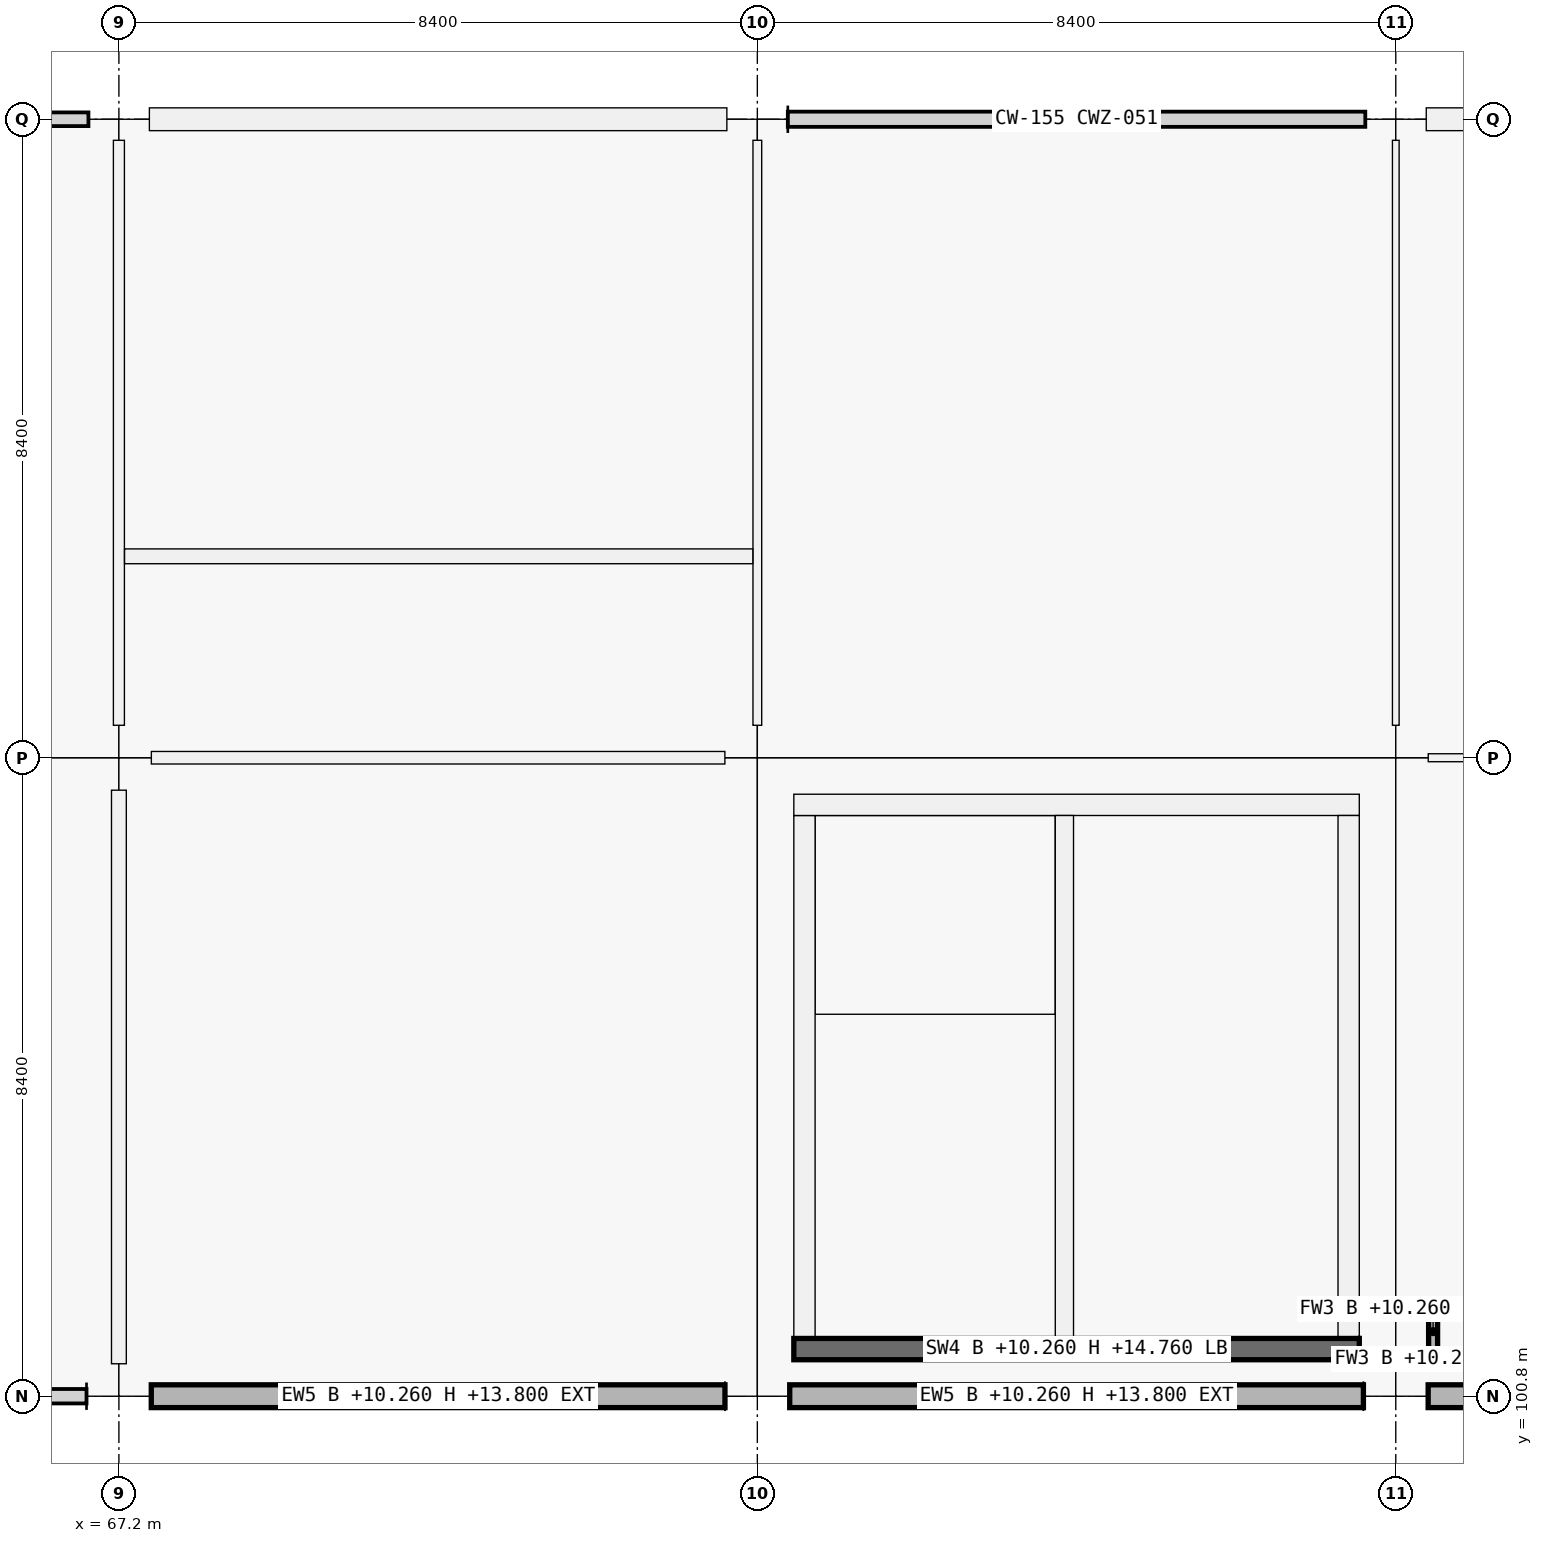
"""IFC4 building model, lengths in metres.
Left out: names, types, materials, properties, quantities, classifications, styles, units other than length and angle.
Written with IfcOpenShell. Run it as: python <this file> out.ifc"""

import sys

from ifc_helpers import new_model, si_unit, direction, frame, frame_2d, origin, origin_2d, place, context, subcontext, project, spatial, rectangle, extrude, element, fill, save


model = new_model("IFC4")
c1 = context("Model", 3, precision=1e-05, world=origin(), true_north=direction((0.0, 1.0)))
c2 = subcontext(c1, "Body", "Model", "MODEL_VIEW")
j1 = project(units=[si_unit("LENGTHUNIT", "METRE"), si_unit("PLANEANGLEUNIT", "RADIAN")], contexts=[c1])
p1 = place(None, origin())
s1 = spatial("IfcSite", under=j1, at=p1, CompositionType="ELEMENT")
p2 = place(p1, origin())
s2 = spatial("IfcBuilding", under=s1, at=p2, CompositionType="ELEMENT")
p3 = place(p2, frame((0.0, 0.0, 10.26)))
s3 = spatial("IfcBuildingStorey", under=s2, at=p3, CompositionType="ELEMENT", Elevation=10.26)
for number, where, z_axis, x_axis in (
    (1, (67.2, 100.8, 0.0), (0.0, 0.0, 1.0), (1.0, 0.0, 0.0)),
    (2, (67.2, 109.2, 0.0), (0.0, 0.0, 1.0), (1.0, 0.0, 0.0)),
):
    element("IfcColumn", number, at=place(p3, frame(where, z_axis=z_axis, x_axis=x_axis)), inside=s3, PredefinedType="COLUMN", context=c2, shape_type="SweptSolid", body=[
        extrude(rectangle(XDim=0.85, YDim=0.85, at=origin_2d()), origin(), (0.0, 0.0, 1.0), 4.5),
    ])
p4 = place(p3, frame((67.2, 117.6, 0.0), z_axis=(0.0, 0.0, 1.0), x_axis=(1.0, 0.0, 0.0)))
e3 = element("IfcColumn", 3, at=p4, inside=s3, PredefinedType="COLUMN", context=c2, shape_type="SweptSolid", body=[
    extrude(rectangle(XDim=0.8, YDim=0.55, at=origin_2d()), origin(), (0.0, 0.0, 1.0), 4.5),
])
for number, where, z_axis, x_axis in (
    (4, (75.6, 100.8, 0.0), (0.0, 0.0, 1.0), (1.0, 0.0, 0.0)),
    (5, (75.6, 109.2, 0.0), (0.0, 0.0, 1.0), (1.0, 0.0, 0.0)),
):
    element("IfcColumn", number, at=place(p3, frame(where, z_axis=z_axis, x_axis=x_axis)), inside=s3, PredefinedType="COLUMN", context=c2, shape_type="SweptSolid", body=[
        extrude(rectangle(XDim=0.85, YDim=0.85, at=origin_2d()), origin(), (0.0, 0.0, 1.0), 4.5),
    ])
p5 = place(p3, frame((75.6, 117.6, 0.0), z_axis=(0.0, 0.0, 1.0), x_axis=(1.0, 0.0, 0.0)))
e6 = element("IfcColumn", 6, at=p5, inside=s3, PredefinedType="COLUMN", context=c2, shape_type="SweptSolid", body=[
    extrude(rectangle(XDim=0.8, YDim=0.55, at=origin_2d()), origin(), (0.0, 0.0, 1.0), 4.5),
])
for number, where, z_axis, x_axis in (
    (7, (84.0, 100.8, 0.0), (0.0, 0.0, 1.0), (1.0, 0.0, 0.0)),
    (8, (84.0, 109.2, 0.0), (0.0, 0.0, 1.0), (1.0, 0.0, 0.0)),
):
    element("IfcColumn", number, at=place(p3, frame(where, z_axis=z_axis, x_axis=x_axis)), inside=s3, PredefinedType="COLUMN", context=c2, shape_type="SweptSolid", body=[
        extrude(rectangle(XDim=0.85, YDim=0.85, at=origin_2d()), origin(), (0.0, 0.0, 1.0), 4.5),
    ])
p6 = place(p3, frame((84.0, 117.6, 0.0), z_axis=(0.0, 0.0, 1.0), x_axis=(1.0, 0.0, 0.0)))
e9 = element("IfcColumn", 9, at=p6, inside=s3, PredefinedType="COLUMN", context=c2, shape_type="SweptSolid", body=[
    extrude(rectangle(XDim=0.8, YDim=0.55, at=origin_2d()), origin(), (0.0, 0.0, 1.0), 4.5),
])
p7 = place(p3, frame((75.174, 100.8, 0.0), z_axis=(0.0, 0.0, 1.0), x_axis=(-1.0, 0.0, 0.0)))
e10 = element("IfcWall", 10, at=p7, inside=s3, PredefinedType="SOLIDWALL", context=c2, shape_type="SweptSolid", body=[
    extrude(rectangle(XDim=7.548, YDim=0.3, at=frame_2d((3.774, 0.0))), origin(), (0.0, 0.0, 1.0), 3.54),
])
p8 = place(p3, frame((67.601, 117.6, 0.0), z_axis=(0.0, 0.0, 1.0), x_axis=(1.0, 0.0, 0.0)))
e11 = element("IfcWall", 11, at=p8, inside=s3, PredefinedType="SOLIDWALL", context=c2, shape_type="SweptSolid", body=[
    extrude(rectangle(XDim=7.598, YDim=0.3, at=frame_2d((3.799, 0.0))), origin(), (0.0, 0.0, 1.0), 3.54),
])
p9 = place(p8, frame((3.124, 0.0, 0.9)))
e12 = element("IfcOpeningElement", 12, at=p9, cuts=e11, PredefinedType="OPENING", context=c2, shape_type="SweptSolid", body=[
    extrude(rectangle(XDim=1.35, YDim=1.5, at=frame_2d((0.675, 0.75))), frame((0.0, 0.15, 0.0), z_axis=(0.0, -1.0, 0.0), x_axis=(1.0, 0.0, 0.0)), (0.0, 0.0, 1.0), 0.3),
])
p10 = place(p3, frame((83.574, 100.8, 0.0), z_axis=(0.0, 0.0, 1.0), x_axis=(-1.0, 0.0, 0.0)))
e13 = element("IfcWall", 13, at=p10, inside=s3, PredefinedType="SOLIDWALL", context=c2, shape_type="SweptSolid", body=[
    extrude(rectangle(XDim=7.548, YDim=0.3, at=frame_2d((3.774, 0.0))), origin(), (0.0, 0.0, 1.0), 3.54),
])
p11 = place(p3, frame((91.974, 100.8, 0.0), z_axis=(0.0, 0.0, 1.0), x_axis=(-1.0, 0.0, 0.0)))
e14 = element("IfcWall", 14, at=p11, inside=s3, PredefinedType="SOLIDWALL", context=c2, shape_type="SweptSolid", body=[
    extrude(rectangle(XDim=7.548, YDim=0.3, at=frame_2d((3.774, 0.0))), origin(), (0.0, 0.0, 1.0), 3.54),
])
p12 = place(p11, frame((3.324, 0.0, 0.9)))
e15 = element("IfcOpeningElement", 15, at=p12, cuts=e14, PredefinedType="OPENING", context=c2, shape_type="SweptSolid", body=[
    extrude(rectangle(XDim=0.9, YDim=1.5, at=frame_2d((0.45, 0.75))), frame((0.0, 0.15, 0.0), z_axis=(0.0, -1.0, 0.0), x_axis=(1.0, 0.0, 0.0)), (0.0, 0.0, 1.0), 0.3),
])
p13 = place(p3, frame((84.401, 117.6, 0.0), z_axis=(0.0, 0.0, 1.0), x_axis=(1.0, 0.0, 0.0)))
e16 = element("IfcWall", 16, at=p13, inside=s3, PredefinedType="SOLIDWALL", context=c2, shape_type="SweptSolid", body=[
    extrude(rectangle(XDim=7.598, YDim=0.3, at=frame_2d((3.799, 0.0))), origin(), (0.0, 0.0, 1.0), 3.54),
])
p14 = place(p13, frame((2.949, 0.0, 0.9)))
e17 = element("IfcOpeningElement", 17, at=p14, cuts=e16, PredefinedType="OPENING", context=c2, shape_type="SweptSolid", body=[
    extrude(rectangle(XDim=1.7, YDim=1.85, at=frame_2d((0.85, 0.925))), frame((0.0, 0.15, 0.0), z_axis=(0.0, -1.0, 0.0), x_axis=(1.0, 0.0, 0.0)), (0.0, 0.0, 1.0), 0.3),
])
p15 = place(p3, frame((83.52, 101.42, 0.0), z_axis=(0.0, 0.0, 1.0), x_axis=(-1.0, 0.0, 0.0)))
e18 = element("IfcWall", 18, at=p15, inside=s3, PredefinedType="SHEAR", context=c2, shape_type="SweptSolid", body=[
    extrude(rectangle(XDim=7.44, YDim=0.28, at=frame_2d((3.72, 0.0))), origin(), (0.0, 0.0, 1.0), 4.5),
])
p16 = place(p3, frame((76.22, 101.56, 0.0), z_axis=(0.0, 0.0, 1.0), x_axis=(0.0, 1.0, 0.0)))
e19 = element("IfcWall", 19, at=p16, inside=s3, PredefinedType="SHEAR", context=c2, shape_type="SweptSolid", body=[
    extrude(rectangle(XDim=6.88, YDim=0.28, at=frame_2d((3.44, 0.0))), origin(), (0.0, 0.0, 1.0), 4.5),
])
p17 = place(p3, frame((76.08, 108.58, 0.0), z_axis=(0.0, 0.0, 1.0), x_axis=(1.0, 0.0, 0.0)))
e20 = element("IfcWall", 20, at=p17, inside=s3, PredefinedType="SHEAR", context=c2, shape_type="SweptSolid", body=[
    extrude(rectangle(XDim=7.44, YDim=0.28, at=frame_2d((3.72, 0.0))), origin(), (0.0, 0.0, 1.0), 4.5),
])
p18 = place(p3, frame((83.38, 108.44, 0.0), z_axis=(0.0, 0.0, 1.0), x_axis=(0.0, -1.0, 0.0)))
e21 = element("IfcWall", 21, at=p18, inside=s3, PredefinedType="SHEAR", context=c2, shape_type="SweptSolid", body=[
    extrude(rectangle(XDim=6.88, YDim=0.28, at=frame_2d((3.44, 0.0))), origin(), (0.0, 0.0, 1.0), 4.5),
])
p19 = place(p18, frame((3.99, 0.0, 0.0)))
e22 = element("IfcOpeningElement", 22, at=p19, cuts=e21, PredefinedType="OPENING", context=c2, shape_type="SweptSolid", body=[
    extrude(rectangle(XDim=1.5, YDim=2.15, at=frame_2d((0.75, 1.075))), frame((0.0, 0.14, 0.0), z_axis=(0.0, -1.0, 0.0), x_axis=(1.0, 0.0, 0.0)), (0.0, 0.0, 1.0), 0.28),
])
p20 = place(p3, frame((79.64, 101.56, 0.0), z_axis=(0.0, 0.0, 1.0), x_axis=(0.0, 1.0, 0.0)))
e23 = element("IfcWall", 23, at=p20, inside=s3, PredefinedType="SHEAR", context=c2, shape_type="SweptSolid", body=[
    extrude(rectangle(XDim=6.88, YDim=0.24, at=frame_2d((3.44, 0.0))), origin(), (0.0, 0.0, 1.0), 4.5),
])
p21 = place(p20, frame((0.12, 0.0, 0.0)))
e24 = element("IfcOpeningElement", 24, at=p21, cuts=e23, PredefinedType="OPENING", context=c2, shape_type="SweptSolid", body=[
    extrude(rectangle(XDim=1.0, YDim=2.15, at=frame_2d((0.5, 1.075))), frame((0.0, 0.12, 0.0), z_axis=(0.0, -1.0, 0.0), x_axis=(1.0, 0.0, 0.0)), (0.0, 0.0, 1.0), 0.24),
])
for number, where, z_axis, x_axis in (
    (25, (84.432, 101.291, 0.0), (0.0, 0.0, 1.0), (1.0, 0.0, 0.0)),
    (26, (84.432, 102.009, 0.0), (0.0, 0.0, 1.0), (1.0, 0.0, 0.0)),
):
    element("IfcWall", number, at=place(p3, frame(where, z_axis=z_axis, x_axis=x_axis)), inside=s3, PredefinedType="PARTITIONING", context=c2, shape_type="SweptSolid", body=[
        extrude(rectangle(XDim=1.036, YDim=0.118, at=frame_2d((0.518, 0.0))), origin(), (0.0, 0.0, 1.0), 3.53),
    ])
p22 = place(p3, frame((84.491, 101.35, 0.0), z_axis=(0.0, 0.0, 1.0), x_axis=(0.0, 1.0, 0.0)))
e27 = element("IfcWall", 27, at=p22, inside=s3, PredefinedType="PARTITIONING", context=c2, shape_type="SweptSolid", body=[
    extrude(rectangle(XDim=0.6, YDim=0.118, at=frame_2d((0.3, 0.0))), origin(), (0.0, 0.0, 1.0), 3.53),
])
p23 = place(p3, frame((67.627, 109.2, 0.0), z_axis=(0.0, 0.0, 1.0), x_axis=(1.0, 0.0, 0.0)))
e28 = element("IfcWall", 28, at=p23, inside=s3, PredefinedType="PARTITIONING", context=c2, shape_type="SweptSolid", body=[
    extrude(rectangle(XDim=7.546, YDim=0.165, at=frame_2d((3.773, 0.0))), origin(), (0.0, 0.0, 1.0), 3.37),
])
p24 = place(p3, frame((84.427, 109.2, 0.0), z_axis=(0.0, 0.0, 1.0), x_axis=(1.0, 0.0, 0.0)))
e29 = element("IfcWall", 29, at=p24, inside=s3, PredefinedType="PARTITIONING", context=c2, shape_type="SweptSolid", body=[
    extrude(rectangle(XDim=7.546, YDim=0.105, at=frame_2d((3.773, 0.0))), origin(), (0.0, 0.0, 1.0), 3.37),
])
p25 = place(p24, frame((3.288, 0.0, 0.0)))
e30 = element("IfcOpeningElement", 30, at=p25, cuts=e29, PredefinedType="OPENING", context=c2, shape_type="SweptSolid", body=[
    extrude(rectangle(XDim=0.97, YDim=2.12, at=frame_2d((0.485, 1.06))), frame((0.0, 0.052, 0.0), z_axis=(0.0, -1.0, 0.0), x_axis=(1.0, 0.0, 0.0)), (0.0, 0.0, 1.0), 0.105),
])
p26 = place(p3, frame((67.2, 101.227, 0.0), z_axis=(0.0, 0.0, 1.0), x_axis=(0.0, 1.0, 0.0)))
e31 = element("IfcWall", 31, at=p26, inside=s3, PredefinedType="PARTITIONING", context=c2, shape_type="SweptSolid", body=[
    extrude(rectangle(XDim=7.546, YDim=0.195, at=frame_2d((3.773, 0.0))), origin(), (0.0, 0.0, 1.0), 3.37),
])
p27 = place(p26, frame((3.273, 0.0, 0.0)))
e32 = element("IfcOpeningElement", 32, at=p27, cuts=e31, PredefinedType="OPENING", context=c2, shape_type="SweptSolid", body=[
    extrude(rectangle(XDim=1.0, YDim=2.2, at=frame_2d((0.5, 1.1))), frame((0.0, 0.098, 0.0), z_axis=(0.0, -1.0, 0.0), x_axis=(1.0, 0.0, 0.0)), (0.0, 0.0, 1.0), 0.195),
])
p28 = place(p3, frame((67.2, 109.627, 0.0), z_axis=(0.0, 0.0, 1.0), x_axis=(0.0, 1.0, 0.0)))
e33 = element("IfcWall", 33, at=p28, inside=s3, PredefinedType="PARTITIONING", context=c2, shape_type="SweptSolid", body=[
    extrude(rectangle(XDim=7.696, YDim=0.145, at=frame_2d((3.848, 0.0))), origin(), (0.0, 0.0, 1.0), 3.37),
])
p29 = place(p28, frame((0.558, 0.0, 0.0)))
e34 = element("IfcOpeningElement", 34, at=p29, cuts=e33, PredefinedType="OPENING", context=c2, shape_type="SweptSolid", body=[
    extrude(rectangle(XDim=0.96, YDim=2.1, at=frame_2d((0.48, 1.05))), frame((0.0, 0.073, 0.0), z_axis=(0.0, -1.0, 0.0), x_axis=(1.0, 0.0, 0.0)), (0.0, 0.0, 1.0), 0.145),
])
p30 = place(p28, frame((4.498, 0.0, 0.0)))
e35 = element("IfcOpeningElement", 35, at=p30, cuts=e33, PredefinedType="OPENING", context=c2, shape_type="SweptSolid", body=[
    extrude(rectangle(XDim=0.92, YDim=2.1, at=frame_2d((0.46, 1.05))), frame((0.0, 0.073, 0.0), z_axis=(0.0, -1.0, 0.0), x_axis=(1.0, 0.0, 0.0)), (0.0, 0.0, 1.0), 0.145),
])
p31 = place(p3, frame((75.6, 109.627, 0.0), z_axis=(0.0, 0.0, 1.0), x_axis=(0.0, 1.0, 0.0)))
e36 = element("IfcWall", 36, at=p31, inside=s3, PredefinedType="PARTITIONING", context=c2, shape_type="SweptSolid", body=[
    extrude(rectangle(XDim=7.696, YDim=0.115, at=frame_2d((3.848, 0.0))), origin(), (0.0, 0.0, 1.0), 3.37),
])
p32 = place(p3, frame((84.0, 109.627, 0.0), z_axis=(0.0, 0.0, 1.0), x_axis=(0.0, 1.0, 0.0)))
e37 = element("IfcWall", 37, at=p32, inside=s3, PredefinedType="PARTITIONING", context=c2, shape_type="SweptSolid", body=[
    extrude(rectangle(XDim=7.696, YDim=0.088, at=frame_2d((3.848, 0.0))), origin(), (0.0, 0.0, 1.0), 3.37),
])
p33 = place(p32, frame((3.343, 0.0, 0.0)))
e38 = element("IfcOpeningElement", 38, at=p33, cuts=e37, PredefinedType="OPENING", context=c2, shape_type="SweptSolid", body=[
    extrude(rectangle(XDim=1.01, YDim=2.12, at=frame_2d((0.505, 1.06))), frame((0.0, 0.044, 0.0), z_axis=(0.0, -1.0, 0.0), x_axis=(1.0, 0.0, 0.0)), (0.0, 0.0, 1.0), 0.088),
])
p34 = place(p3, frame((67.274, 111.85, 0.0), z_axis=(0.0, 0.0, 1.0), x_axis=(1.0, 0.0, 0.0)))
e39 = element("IfcWall", 39, at=p34, inside=s3, PredefinedType="PARTITIONING", context=c2, shape_type="SweptSolid", body=[
    extrude(rectangle(XDim=8.266, YDim=0.195, at=frame_2d((4.133, 0.0))), origin(), (0.0, 0.0, 1.0), 3.37),
])
p35 = place(p9, origin())
e40 = element("IfcWindow", 40, at=p35, inside=s3, PartitioningType="SINGLE_PANEL", PredefinedType="WINDOW", context=c2, shape_type="SweptSolid", body=[
    extrude(rectangle(XDim=1.35, YDim=1.5, at=frame_2d((0.675, 0.75))), frame((0.0, 0.03, 0.0), z_axis=(0.0, -1.0, 0.0), x_axis=(1.0, 0.0, 0.0)), (0.0, 0.0, 1.0), 0.06),
])
fill(e12, e40)
p36 = place(p21, origin())
e41 = element("IfcDoor", 41, at=p36, inside=s3, OperationType="SINGLE_SWING_RIGHT", PredefinedType="DOOR", context=c2, shape_type="SweptSolid", body=[
    extrude(rectangle(XDim=1.0, YDim=2.15, at=frame_2d((0.5, 1.075))), frame((0.0, 0.025, 0.0), z_axis=(0.0, -1.0, 0.0), x_axis=(1.0, 0.0, 0.0)), (0.0, 0.0, 1.0), 0.05),
])
fill(e24, e41)
p37 = place(p19, origin())
e42 = element("IfcDoor", 42, at=p37, inside=s3, OperationType="DOUBLE_DOOR_SINGLE_SWING", PredefinedType="DOOR", context=c2, shape_type="SweptSolid", body=[
    extrude(rectangle(XDim=1.5, YDim=2.15, at=frame_2d((0.75, 1.075))), frame((0.0, 0.025, 0.0), z_axis=(0.0, -1.0, 0.0), x_axis=(1.0, 0.0, 0.0)), (0.0, 0.0, 1.0), 0.05),
])
fill(e22, e42)
p38 = place(p29, origin())
e43 = element("IfcDoor", 43, at=p38, inside=s3, OperationType="SINGLE_SWING_RIGHT", PredefinedType="DOOR", context=c2, shape_type="SweptSolid", body=[
    extrude(rectangle(XDim=0.96, YDim=2.1, at=frame_2d((0.48, 1.05))), frame((0.0, 0.025, 0.0), z_axis=(0.0, -1.0, 0.0), x_axis=(1.0, 0.0, 0.0)), (0.0, 0.0, 1.0), 0.05),
])
fill(e34, e43)
p39 = place(p30, origin())
e44 = element("IfcDoor", 44, at=p39, inside=s3, OperationType="SINGLE_SWING_LEFT", PredefinedType="DOOR", context=c2, shape_type="SweptSolid", body=[
    extrude(rectangle(XDim=0.92, YDim=2.1, at=frame_2d((0.46, 1.05))), frame((0.0, 0.025, 0.0), z_axis=(0.0, -1.0, 0.0), x_axis=(1.0, 0.0, 0.0)), (0.0, 0.0, 1.0), 0.05),
])
fill(e35, e44)
p40 = place(p27, origin())
e45 = element("IfcDoor", 45, at=p40, inside=s3, OperationType="SINGLE_SWING_LEFT", PredefinedType="DOOR", context=c2, shape_type="SweptSolid", body=[
    extrude(rectangle(XDim=1.0, YDim=2.2, at=frame_2d((0.5, 1.1))), frame((0.0, 0.025, 0.0), z_axis=(0.0, -1.0, 0.0), x_axis=(1.0, 0.0, 0.0)), (0.0, 0.0, 1.0), 0.05),
])
fill(e32, e45)
p41 = place(p33, origin())
e46 = element("IfcDoor", 46, at=p41, inside=s3, OperationType="SINGLE_SWING_RIGHT", PredefinedType="DOOR", context=c2, shape_type="SweptSolid", body=[
    extrude(rectangle(XDim=1.01, YDim=2.12, at=frame_2d((0.505, 1.06))), frame((0.0, 0.025, 0.0), z_axis=(0.0, -1.0, 0.0), x_axis=(1.0, 0.0, 0.0)), (0.0, 0.0, 1.0), 0.05),
])
fill(e38, e46)
save(model, sys.argv[1])
